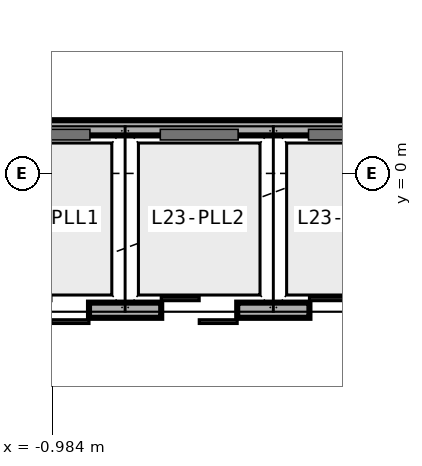
"""IFC4 building model, lengths in metres.
Left out: names, types, materials, properties, quantities, classifications, styles, units other than length and angle.
Written with IfcOpenShell. Run it as: python <this file> out.ifc"""

import sys

from ifc_helpers import new_model, si_unit, direction, frame, frame_2d, origin, place, context, subcontext, project, spatial, rectangle, extrude, element, fill, save


model = new_model("IFC4")
c1 = context("Model", 3, precision=1e-05, world=origin(), true_north=direction((0.0, 1.0)))
c2 = subcontext(c1, "Body", "Model", "MODEL_VIEW")
j1 = project(units=[si_unit("LENGTHUNIT", "METRE"), si_unit("PLANEANGLEUNIT", "RADIAN")], contexts=[c1])
p1 = place(None, origin())
s1 = spatial("IfcSite", under=j1, at=p1, CompositionType="ELEMENT")
p2 = place(p1, origin())
s2 = spatial("IfcBuilding", under=s1, at=p2, CompositionType="ELEMENT")
p3 = place(p2, frame((0.0, 0.0, 95.4)))
s3 = spatial("IfcBuildingStorey", under=s2, at=p3, CompositionType="ELEMENT", Elevation=95.4)
p4 = place(p3, frame((-2.0, -1.8, 0.0), z_axis=(0.0, 0.0, 1.0), x_axis=(1.0, 0.0, 0.0)))
e1 = element("IfcWall", 1, at=p4, inside=s3, PredefinedType="SOLIDWALL", context=c2, shape_type="SweptSolid", body=[
    extrude(rectangle(XDim=6.0, YDim=0.2, at=frame_2d((3.0, 0.0))), origin(), (0.0, 0.0, 1.0), 3.64),
])
p5 = place(p4, frame((0.5, 0.0, 0.0)))
e2 = element("IfcOpeningElement", 2, at=p5, cuts=e1, PredefinedType="OPENING", context=c2, shape_type="SweptSolid", body=[
    extrude(rectangle(XDim=1.0, YDim=2.2, at=frame_2d((0.5, 1.1))), frame((0.0, 0.11, 0.0), z_axis=(0.0, -1.0, 0.0), x_axis=(1.0, 0.0, 0.0)), (0.0, 0.0, 1.0), 0.22),
])
p6 = place(p4, frame((2.45, 0.0, 0.0)))
e3 = element("IfcOpeningElement", 3, at=p6, cuts=e1, PredefinedType="OPENING", context=c2, shape_type="SweptSolid", body=[
    extrude(rectangle(XDim=1.0, YDim=2.2, at=frame_2d((0.5, 1.1))), frame((0.0, 0.11, 0.0), z_axis=(0.0, -1.0, 0.0), x_axis=(1.0, 0.0, 0.0)), (0.0, 0.0, 1.0), 0.22),
])
p7 = place(p4, frame((4.4, 0.0, 0.0)))
e4 = element("IfcOpeningElement", 4, at=p7, cuts=e1, PredefinedType="OPENING", context=c2, shape_type="SweptSolid", body=[
    extrude(rectangle(XDim=1.0, YDim=2.2, at=frame_2d((0.5, 1.1))), frame((0.0, 0.11, 0.0), z_axis=(0.0, -1.0, 0.0), x_axis=(1.0, 0.0, 0.0)), (0.0, 0.0, 1.0), 0.22),
])
p8 = place(p3, frame((-1.88, 0.6, 0.0), z_axis=(0.0, 0.0, 1.0), x_axis=(1.0, 0.0, 0.0)))
e5 = element("IfcWall", 5, at=p8, inside=s3, PredefinedType="MOVABLE", context=c2, shape_type="SweptSolid", body=[
    extrude(rectangle(XDim=5.72, YDim=0.2, at=frame_2d((2.86, 0.0))), origin(), (0.0, 0.0, 1.0), 3.172),
])
p9 = place(p5, origin())
e6 = element("IfcDoor", 6, at=p9, inside=s3, OperationType="DOUBLE_DOOR_SLIDING", PredefinedType="DOOR", context=c2, shape_type="SweptSolid", body=[
    extrude(rectangle(XDim=1.0, YDim=2.2, at=frame_2d((0.5, 1.1))), frame((0.0, 0.025, 0.0), z_axis=(0.0, -1.0, 0.0), x_axis=(1.0, 0.0, 0.0)), (0.0, 0.0, 1.0), 0.05),
])
fill(e2, e6)
p10 = place(p6, origin())
e7 = element("IfcDoor", 7, at=p10, inside=s3, OperationType="DOUBLE_DOOR_SLIDING", PredefinedType="DOOR", context=c2, shape_type="SweptSolid", body=[
    extrude(rectangle(XDim=1.0, YDim=2.2, at=frame_2d((0.5, 1.1))), frame((0.0, 0.025, 0.0), z_axis=(0.0, -1.0, 0.0), x_axis=(1.0, 0.0, 0.0)), (0.0, 0.0, 1.0), 0.05),
])
fill(e3, e7)
p11 = place(p7, origin())
e8 = element("IfcDoor", 8, at=p11, inside=s3, OperationType="DOUBLE_DOOR_SLIDING", PredefinedType="DOOR", context=c2, shape_type="SweptSolid", body=[
    extrude(rectangle(XDim=1.0, YDim=2.2, at=frame_2d((0.5, 1.1))), frame((0.0, 0.025, 0.0), z_axis=(0.0, -1.0, 0.0), x_axis=(1.0, 0.0, 0.0)), (0.0, 0.0, 1.0), 0.05),
])
fill(e4, e8)
save(model, sys.argv[1])
